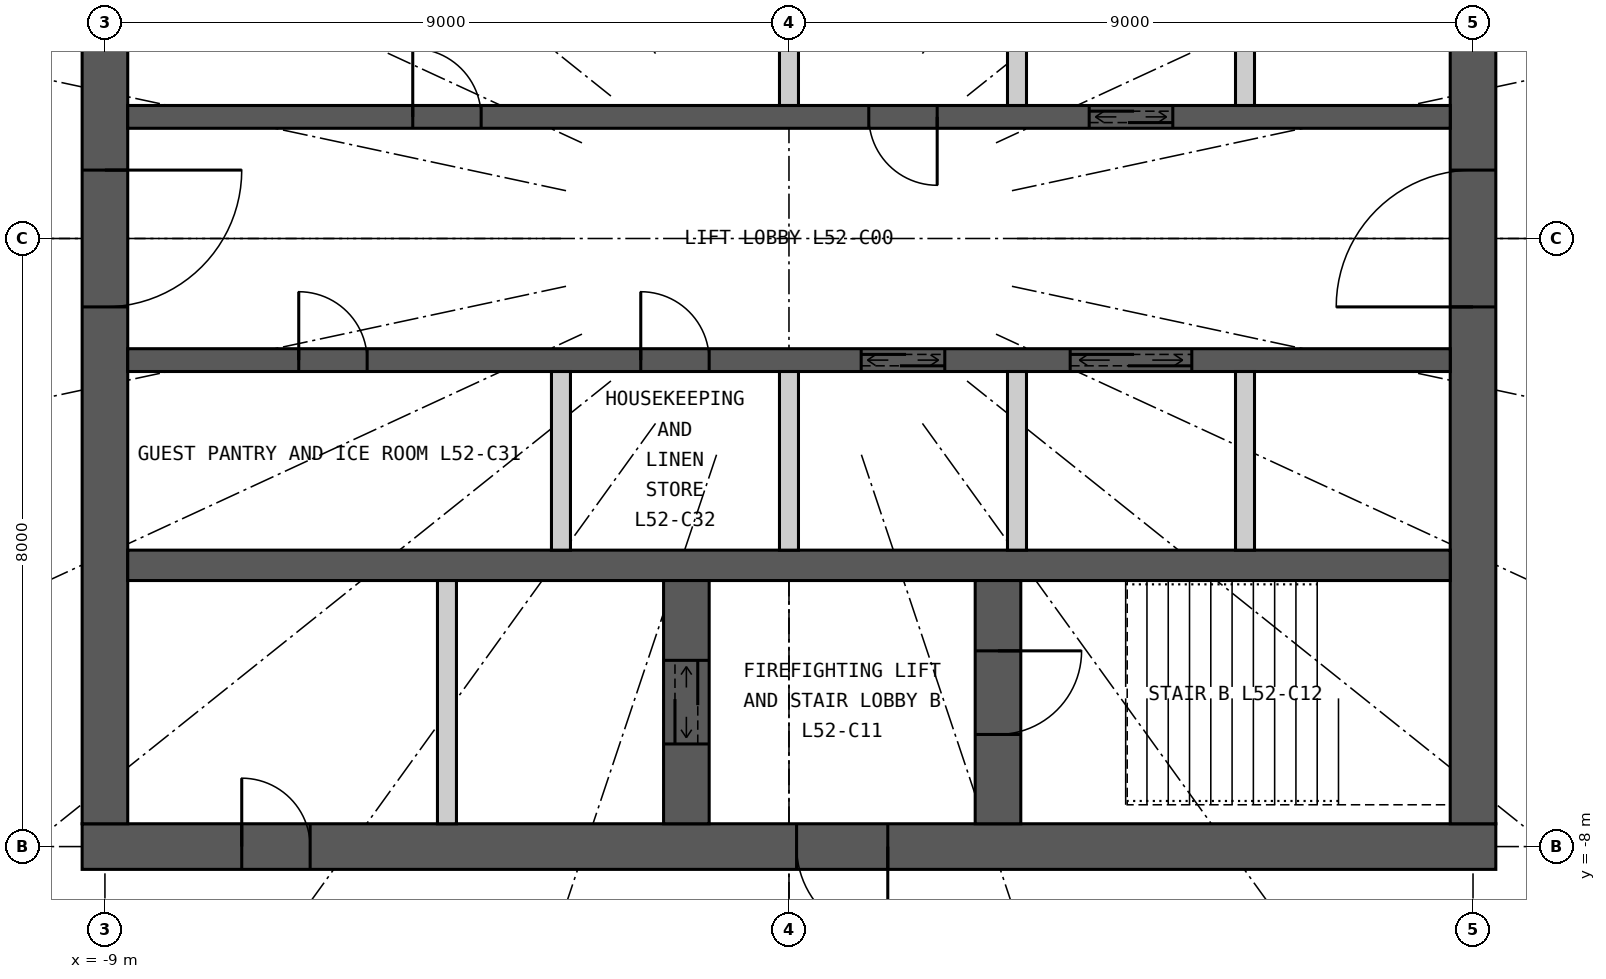
"""IFC4 building model, lengths in metres.
Left out: names, types, materials, properties, quantities, classifications, styles, units other than length and angle.
Written with IfcOpenShell. Run it as: python <this file> out.ifc"""

import sys

from ifc_helpers import new_model, si_unit, direction, frame, frame_2d, origin, place, context, subcontext, project, spatial, rectangle, extrude, element, fill, save


model = new_model("IFC4")
c1 = context("Model", 3, precision=1e-05, world=origin(), true_north=direction((0.0, 1.0)))
c2 = subcontext(c1, "Body", "Model", "MODEL_VIEW")
j1 = project(units=[si_unit("LENGTHUNIT", "METRE"), si_unit("PLANEANGLEUNIT", "RADIAN")], contexts=[c1])
p1 = place(None, origin())
s1 = spatial("IfcSite", under=j1, at=p1, CompositionType="ELEMENT")
p2 = place(p1, origin())
s2 = spatial("IfcBuilding", under=s1, at=p2, CompositionType="ELEMENT")
p3 = place(p2, frame((0.0, 0.0, 196.2)))
s3 = spatial("IfcBuildingStorey", under=s2, at=p3, CompositionType="ELEMENT", Elevation=196.2)
p4 = place(p3, frame((9.3, -8.0, 0.0), z_axis=(0.0, 0.0, 1.0), x_axis=(-1.0, 0.0, 0.0)))
e1 = element("IfcWall", 1, at=p4, inside=s3, PredefinedType="SHEAR", context=c2, shape_type="SweptSolid", body=[
    extrude(rectangle(XDim=18.6, YDim=0.6, at=frame_2d((9.3, 0.0))), origin(), (0.0, 0.0, 1.0), 3.3),
])
p5 = place(p4, frame((8.0, 0.0, 0.0)))
e2 = element("IfcOpeningElement", 2, at=p5, cuts=e1, PredefinedType="OPENING", context=c2, shape_type="SweptSolid", body=[
    extrude(rectangle(XDim=1.2, YDim=2.2, at=frame_2d((0.6, 1.1))), frame((0.0, 0.31, 0.0), z_axis=(0.0, -1.0, 0.0), x_axis=(1.0, 0.0, 0.0)), (0.0, 0.0, 1.0), 0.62),
])
p6 = place(p4, frame((15.6, 0.0, 0.0)))
e3 = element("IfcOpeningElement", 3, at=p6, cuts=e1, PredefinedType="OPENING", context=c2, shape_type="SweptSolid", body=[
    extrude(rectangle(XDim=0.9, YDim=2.2, at=frame_2d((0.45, 1.1))), frame((0.0, 0.31, 0.0), z_axis=(0.0, -1.0, 0.0), x_axis=(1.0, 0.0, 0.0)), (0.0, 0.0, 1.0), 0.62),
])
p7 = place(p3, frame((9.0, -7.7, 0.0), z_axis=(0.0, 0.0, 1.0), x_axis=(0.0, 1.0, 0.0)))
e4 = element("IfcWall", 4, at=p7, inside=s3, PredefinedType="SHEAR", context=c2, shape_type="SweptSolid", body=[
    extrude(rectangle(XDim=15.4, YDim=0.6, at=frame_2d((7.7, 0.0))), origin(), (0.0, 0.0, 1.0), 3.3),
])
p8 = place(p7, frame((6.8, 0.0, 0.0)))
e5 = element("IfcOpeningElement", 5, at=p8, cuts=e4, PredefinedType="OPENING", context=c2, shape_type="SweptSolid", body=[
    extrude(rectangle(XDim=1.8, YDim=2.2, at=frame_2d((0.9, 1.1))), frame((0.0, 0.31, 0.0), z_axis=(0.0, -1.0, 0.0), x_axis=(1.0, 0.0, 0.0)), (0.0, 0.0, 1.0), 0.62),
])
p9 = place(p3, frame((-9.0, 7.7, 0.0), z_axis=(0.0, 0.0, 1.0), x_axis=(0.0, -1.0, 0.0)))
e6 = element("IfcWall", 6, at=p9, inside=s3, PredefinedType="SHEAR", context=c2, shape_type="SweptSolid", body=[
    extrude(rectangle(XDim=15.4, YDim=0.6, at=frame_2d((7.7, 0.0))), origin(), (0.0, 0.0, 1.0), 3.3),
])
p10 = place(p9, frame((6.8, 0.0, 0.0)))
e7 = element("IfcOpeningElement", 7, at=p10, cuts=e6, PredefinedType="OPENING", context=c2, shape_type="SweptSolid", body=[
    extrude(rectangle(XDim=1.8, YDim=2.2, at=frame_2d((0.9, 1.1))), frame((0.0, 0.31, 0.0), z_axis=(0.0, -1.0, 0.0), x_axis=(1.0, 0.0, 0.0)), (0.0, 0.0, 1.0), 0.62),
])
p11 = place(p3, frame((-8.7, 1.6, 0.0), z_axis=(0.0, 0.0, 1.0), x_axis=(1.0, 0.0, 0.0)))
e8 = element("IfcWall", 8, at=p11, inside=s3, PredefinedType="SHEAR", context=c2, shape_type="SweptSolid", body=[
    extrude(rectangle(XDim=17.4, YDim=0.3, at=frame_2d((8.7, 0.0))), origin(), (0.0, 0.0, 1.0), 3.3),
])
p12 = place(p11, frame((12.65, 0.0, 0.0)))
e9 = element("IfcOpeningElement", 9, at=p12, cuts=e8, PredefinedType="OPENING", context=c2, shape_type="SweptSolid", body=[
    extrude(rectangle(XDim=1.1, YDim=2.2, at=frame_2d((0.55, 1.1))), frame((0.0, 0.16, 0.0), z_axis=(0.0, -1.0, 0.0), x_axis=(1.0, 0.0, 0.0)), (0.0, 0.0, 1.0), 0.32),
])
p13 = place(p11, frame((3.75, 0.0, 0.0)))
e10 = element("IfcOpeningElement", 10, at=p13, cuts=e8, PredefinedType="OPENING", context=c2, shape_type="SweptSolid", body=[
    extrude(rectangle(XDim=0.9, YDim=2.2, at=frame_2d((0.45, 1.1))), frame((0.0, 0.16, 0.0), z_axis=(0.0, -1.0, 0.0), x_axis=(1.0, 0.0, 0.0)), (0.0, 0.0, 1.0), 0.32),
])
p14 = place(p11, frame((9.75, 0.0, 0.0)))
e11 = element("IfcOpeningElement", 11, at=p14, cuts=e8, PredefinedType="OPENING", context=c2, shape_type="SweptSolid", body=[
    extrude(rectangle(XDim=0.9, YDim=2.2, at=frame_2d((0.45, 1.1))), frame((0.0, 0.16, 0.0), z_axis=(0.0, -1.0, 0.0), x_axis=(1.0, 0.0, 0.0)), (0.0, 0.0, 1.0), 0.32),
])
p15 = place(p3, frame((-8.7, -4.3, 0.0), z_axis=(0.0, 0.0, 1.0), x_axis=(1.0, 0.0, 0.0)))
e12 = element("IfcWall", 12, at=p15, inside=s3, PredefinedType="SHEAR", context=c2, shape_type="SweptSolid", body=[
    extrude(rectangle(XDim=17.4, YDim=0.4, at=frame_2d((8.7, 0.0))), origin(), (0.0, 0.0, 1.0), 3.3),
])
p16 = place(p3, frame((-8.7, -1.6, 0.0), z_axis=(0.0, 0.0, 1.0), x_axis=(1.0, 0.0, 0.0)))
e13 = element("IfcWall", 13, at=p16, inside=s3, PredefinedType="SHEAR", context=c2, shape_type="SweptSolid", body=[
    extrude(rectangle(XDim=17.4, YDim=0.3, at=frame_2d((8.7, 0.0))), origin(), (0.0, 0.0, 1.0), 3.3),
])
p17 = place(p16, frame((9.65, 0.0, 0.0)))
e14 = element("IfcOpeningElement", 14, at=p17, cuts=e13, PredefinedType="OPENING", context=c2, shape_type="SweptSolid", body=[
    extrude(rectangle(XDim=1.1, YDim=2.2, at=frame_2d((0.55, 1.1))), frame((0.0, 0.16, 0.0), z_axis=(0.0, -1.0, 0.0), x_axis=(1.0, 0.0, 0.0)), (0.0, 0.0, 1.0), 0.32),
])
p18 = place(p16, frame((12.4, 0.0, 0.0)))
e15 = element("IfcOpeningElement", 15, at=p18, cuts=e13, PredefinedType="OPENING", context=c2, shape_type="SweptSolid", body=[
    extrude(rectangle(XDim=1.6, YDim=2.4, at=frame_2d((0.8, 1.2))), frame((0.0, 0.16, 0.0), z_axis=(0.0, -1.0, 0.0), x_axis=(1.0, 0.0, 0.0)), (0.0, 0.0, 1.0), 0.32),
])
p19 = place(p16, frame((2.25, 0.0, 0.0)))
e16 = element("IfcOpeningElement", 16, at=p19, cuts=e13, PredefinedType="OPENING", context=c2, shape_type="SweptSolid", body=[
    extrude(rectangle(XDim=0.9, YDim=2.2, at=frame_2d((0.45, 1.1))), frame((0.0, 0.16, 0.0), z_axis=(0.0, -1.0, 0.0), x_axis=(1.0, 0.0, 0.0)), (0.0, 0.0, 1.0), 0.32),
])
p20 = place(p16, frame((6.75, 0.0, 0.0)))
e17 = element("IfcOpeningElement", 17, at=p20, cuts=e13, PredefinedType="OPENING", context=c2, shape_type="SweptSolid", body=[
    extrude(rectangle(XDim=0.9, YDim=2.2, at=frame_2d((0.45, 1.1))), frame((0.0, 0.16, 0.0), z_axis=(0.0, -1.0, 0.0), x_axis=(1.0, 0.0, 0.0)), (0.0, 0.0, 1.0), 0.32),
])
p21 = place(p3, frame((2.75, -7.7, 0.0), z_axis=(0.0, 0.0, 1.0), x_axis=(0.0, 1.0, 0.0)))
e18 = element("IfcWall", 18, at=p21, inside=s3, PredefinedType="SHEAR", context=c2, shape_type="SweptSolid", body=[
    extrude(rectangle(XDim=3.2, YDim=0.6, at=frame_2d((1.6, 0.0))), origin(), (0.0, 0.0, 1.0), 3.3),
])
p22 = place(p21, frame((1.175, 0.0, 0.0)))
e19 = element("IfcOpeningElement", 19, at=p22, cuts=e18, PredefinedType="OPENING", context=c2, shape_type="SweptSolid", body=[
    extrude(rectangle(XDim=1.1, YDim=2.2, at=frame_2d((0.55, 1.1))), frame((0.0, 0.31, 0.0), z_axis=(0.0, -1.0, 0.0), x_axis=(1.0, 0.0, 0.0)), (0.0, 0.0, 1.0), 0.62),
])
p23 = place(p3, frame((-1.35, -7.7, 0.0), z_axis=(0.0, 0.0, 1.0), x_axis=(0.0, 1.0, 0.0)))
e20 = element("IfcWall", 20, at=p23, inside=s3, PredefinedType="SHEAR", context=c2, shape_type="SweptSolid", body=[
    extrude(rectangle(XDim=3.2, YDim=0.6, at=frame_2d((1.6, 0.0))), origin(), (0.0, 0.0, 1.0), 3.3),
])
p24 = place(p23, frame((1.05, 0.0, 0.0)))
e21 = element("IfcOpeningElement", 21, at=p24, cuts=e20, PredefinedType="OPENING", context=c2, shape_type="SweptSolid", body=[
    extrude(rectangle(XDim=1.1, YDim=2.2, at=frame_2d((0.55, 1.1))), frame((0.0, 0.31, 0.0), z_axis=(0.0, -1.0, 0.0), x_axis=(1.0, 0.0, 0.0)), (0.0, 0.0, 1.0), 0.62),
])
p25 = place(p3, frame((-4.5, -7.7, 0.0), z_axis=(0.0, 0.0, 1.0), x_axis=(0.0, 1.0, 0.0)))
e22 = element("IfcWall", 22, at=p25, inside=s3, PredefinedType="PARTITIONING", context=c2, shape_type="SweptSolid", body=[
    extrude(rectangle(XDim=3.2, YDim=0.25, at=frame_2d((1.6, 0.0))), origin(), (0.0, 0.0, 1.0), 3.3),
])
for number, where, z_axis, x_axis in (
    (23, (0.0, 1.75, 0.0), (0.0, 0.0, 1.0), (0.0, 1.0, 0.0)),
    (24, (3.0, 1.75, 0.0), (0.0, 0.0, 1.0), (0.0, 1.0, 0.0)),
    (25, (6.0, 1.75, 0.0), (0.0, 0.0, 1.0), (0.0, 1.0, 0.0)),
    (26, (-3.0, -4.1, 0.0), (0.0, 0.0, 1.0), (0.0, 1.0, 0.0)),
    (27, (0.0, -4.1, 0.0), (0.0, 0.0, 1.0), (0.0, 1.0, 0.0)),
    (28, (3.0, -4.1, 0.0), (0.0, 0.0, 1.0), (0.0, 1.0, 0.0)),
    (29, (6.0, -4.1, 0.0), (0.0, 0.0, 1.0), (0.0, 1.0, 0.0)),
):
    element("IfcWall", number, at=place(p3, frame(where, z_axis=z_axis, x_axis=x_axis)), inside=s3, PredefinedType="PARTITIONING", context=c2, shape_type="SweptSolid", body=[
        extrude(rectangle(XDim=2.35, YDim=0.25, at=frame_2d((1.175, 0.0))), origin(), (0.0, 0.0, 1.0), 3.3),
    ])
p26 = place(p5, origin())
e30 = element("IfcDoor", 30, at=p26, inside=s3, OperationType="SINGLE_SWING_LEFT", PredefinedType="DOOR", context=c2, shape_type="SweptSolid", body=[
    extrude(rectangle(XDim=1.2, YDim=2.2, at=frame_2d((0.6, 1.1))), frame((0.0, 0.025, 0.0), z_axis=(0.0, -1.0, 0.0), x_axis=(1.0, 0.0, 0.0)), (0.0, 0.0, 1.0), 0.05),
])
fill(e2, e30)
p27 = place(p22, origin())
e31 = element("IfcDoor", 31, at=p27, inside=s3, OperationType="SINGLE_SWING_RIGHT", PredefinedType="DOOR", context=c2, shape_type="SweptSolid", body=[
    extrude(rectangle(XDim=1.1, YDim=2.2, at=frame_2d((0.55, 1.1))), frame((0.0, 0.025, 0.0), z_axis=(0.0, -1.0, 0.0), x_axis=(1.0, 0.0, 0.0)), (0.0, 0.0, 1.0), 0.05),
])
fill(e19, e31)
p28 = place(p24, origin())
e32 = element("IfcDoor", 32, at=p28, inside=s3, OperationType="DOUBLE_DOOR_SLIDING", PredefinedType="DOOR", context=c2, shape_type="SweptSolid", body=[
    extrude(rectangle(XDim=1.1, YDim=2.2, at=frame_2d((0.55, 1.1))), frame((0.0, 0.025, 0.0), z_axis=(0.0, -1.0, 0.0), x_axis=(1.0, 0.0, 0.0)), (0.0, 0.0, 1.0), 0.05),
])
fill(e21, e32)
p29 = place(p6, origin())
e33 = element("IfcDoor", 33, at=p29, inside=s3, OperationType="SINGLE_SWING_RIGHT", PredefinedType="DOOR", context=c2, shape_type="SweptSolid", body=[
    extrude(rectangle(XDim=0.9, YDim=2.2, at=frame_2d((0.45, 1.1))), frame((0.0, 0.025, 0.0), z_axis=(0.0, -1.0, 0.0), x_axis=(1.0, 0.0, 0.0)), (0.0, 0.0, 1.0), 0.05),
])
fill(e3, e33)
p30 = place(p12, origin())
e34 = element("IfcDoor", 34, at=p30, inside=s3, OperationType="DOUBLE_DOOR_SLIDING", PredefinedType="DOOR", context=c2, shape_type="SweptSolid", body=[
    extrude(rectangle(XDim=1.1, YDim=2.2, at=frame_2d((0.55, 1.1))), frame((0.0, 0.025, 0.0), z_axis=(0.0, -1.0, 0.0), x_axis=(1.0, 0.0, 0.0)), (0.0, 0.0, 1.0), 0.05),
])
fill(e9, e34)
p31 = place(p17, origin())
e35 = element("IfcDoor", 35, at=p31, inside=s3, OperationType="DOUBLE_DOOR_SLIDING", PredefinedType="DOOR", context=c2, shape_type="SweptSolid", body=[
    extrude(rectangle(XDim=1.1, YDim=2.2, at=frame_2d((0.55, 1.1))), frame((0.0, 0.025, 0.0), z_axis=(0.0, -1.0, 0.0), x_axis=(1.0, 0.0, 0.0)), (0.0, 0.0, 1.0), 0.05),
])
fill(e14, e35)
p32 = place(p18, origin())
e36 = element("IfcDoor", 36, at=p32, inside=s3, OperationType="DOUBLE_DOOR_SLIDING", PredefinedType="DOOR", context=c2, shape_type="SweptSolid", body=[
    extrude(rectangle(XDim=1.6, YDim=2.4, at=frame_2d((0.8, 1.2))), frame((0.0, 0.025, 0.0), z_axis=(0.0, -1.0, 0.0), x_axis=(1.0, 0.0, 0.0)), (0.0, 0.0, 1.0), 0.05),
])
fill(e15, e36)
p33 = place(p13, origin())
e37 = element("IfcDoor", 37, at=p33, inside=s3, OperationType="SINGLE_SWING_LEFT", PredefinedType="DOOR", context=c2, shape_type="SweptSolid", body=[
    extrude(rectangle(XDim=0.9, YDim=2.2, at=frame_2d((0.45, 1.1))), frame((0.0, 0.025, 0.0), z_axis=(0.0, -1.0, 0.0), x_axis=(1.0, 0.0, 0.0)), (0.0, 0.0, 1.0), 0.05),
])
fill(e10, e37)
p34 = place(p14, origin())
e38 = element("IfcDoor", 38, at=p34, inside=s3, OperationType="SINGLE_SWING_RIGHT", PredefinedType="DOOR", context=c2, shape_type="SweptSolid", body=[
    extrude(rectangle(XDim=0.9, YDim=2.2, at=frame_2d((0.45, 1.1))), frame((0.0, 0.025, 0.0), z_axis=(0.0, -1.0, 0.0), x_axis=(1.0, 0.0, 0.0)), (0.0, 0.0, 1.0), 0.05),
])
fill(e11, e38)
p35 = place(p19, origin())
e39 = element("IfcDoor", 39, at=p35, inside=s3, OperationType="SINGLE_SWING_LEFT", PredefinedType="DOOR", context=c2, shape_type="SweptSolid", body=[
    extrude(rectangle(XDim=0.9, YDim=2.2, at=frame_2d((0.45, 1.1))), frame((0.0, 0.025, 0.0), z_axis=(0.0, -1.0, 0.0), x_axis=(1.0, 0.0, 0.0)), (0.0, 0.0, 1.0), 0.05),
])
fill(e16, e39)
p36 = place(p20, origin())
e40 = element("IfcDoor", 40, at=p36, inside=s3, OperationType="SINGLE_SWING_LEFT", PredefinedType="DOOR", context=c2, shape_type="SweptSolid", body=[
    extrude(rectangle(XDim=0.9, YDim=2.2, at=frame_2d((0.45, 1.1))), frame((0.0, 0.025, 0.0), z_axis=(0.0, -1.0, 0.0), x_axis=(1.0, 0.0, 0.0)), (0.0, 0.0, 1.0), 0.05),
])
fill(e17, e40)
p37 = place(p8, origin())
e41 = element("IfcDoor", 41, at=p37, inside=s3, OperationType="DOUBLE_DOOR_DOUBLE_SWING", PredefinedType="DOOR", context=c2, shape_type="SweptSolid", body=[
    extrude(rectangle(XDim=1.8, YDim=2.2, at=frame_2d((0.9, 1.1))), frame((0.0, 0.025, 0.0), z_axis=(0.0, -1.0, 0.0), x_axis=(1.0, 0.0, 0.0)), (0.0, 0.0, 1.0), 0.05),
])
fill(e5, e41)
p38 = place(p10, origin())
e42 = element("IfcDoor", 42, at=p38, inside=s3, OperationType="DOUBLE_DOOR_DOUBLE_SWING", PredefinedType="DOOR", context=c2, shape_type="SweptSolid", body=[
    extrude(rectangle(XDim=1.8, YDim=2.2, at=frame_2d((0.9, 1.1))), frame((0.0, 0.025, 0.0), z_axis=(0.0, -1.0, 0.0), x_axis=(1.0, 0.0, 0.0)), (0.0, 0.0, 1.0), 0.05),
])
fill(e7, e42)
save(model, sys.argv[1])
